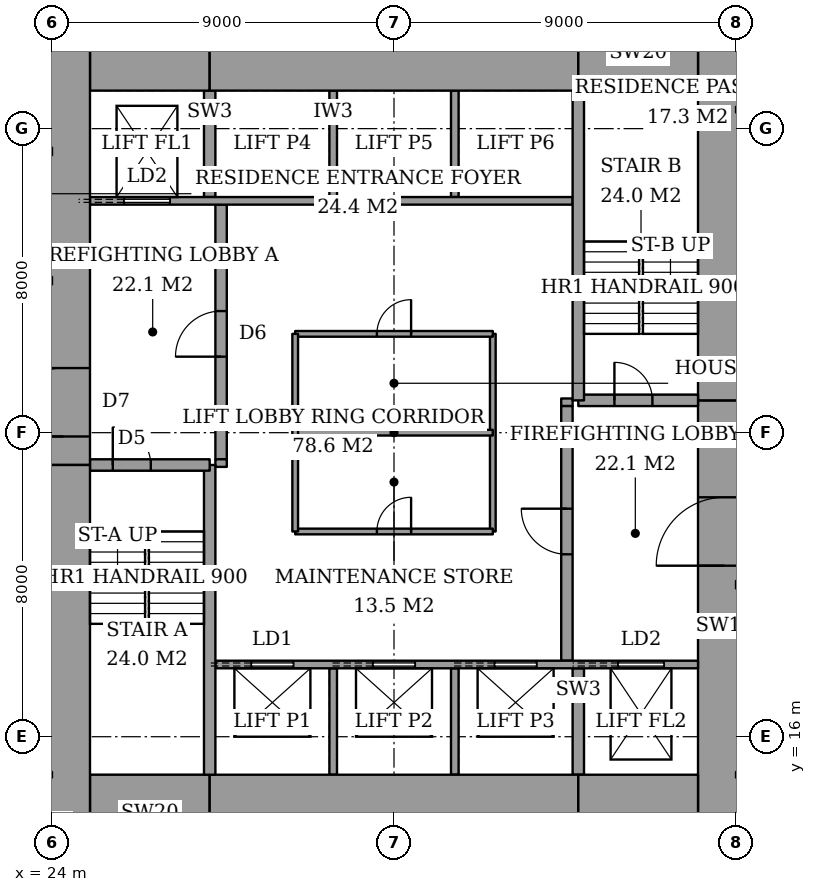
"""IFC4 building model, lengths in metres.
Left out: names, types, materials, properties, quantities, classifications, styles, units other than length and angle.
Written with IfcOpenShell. Run it as: python <this file> out.ifc"""

import sys

from ifc_helpers import new_model, si_unit, direction, frame, frame_2d, origin, place, context, subcontext, project, spatial, rectangle, extrude, element, fill, save


model = new_model("IFC4")
c1 = context("Model", 3, precision=1e-05, world=origin(), true_north=direction((0.0, 1.0)))
c2 = subcontext(c1, "Body", "Model", "MODEL_VIEW")
j1 = project(units=[si_unit("LENGTHUNIT", "METRE"), si_unit("PLANEANGLEUNIT", "RADIAN")], contexts=[c1])
p1 = place(None, origin())
s1 = spatial("IfcSite", under=j1, at=p1, CompositionType="ELEMENT")
p2 = place(p1, origin())
s2 = spatial("IfcBuilding", under=s1, at=p2, CompositionType="ELEMENT")
p3 = place(p2, frame((0.0, 0.0, 69.2)))
s3 = spatial("IfcBuildingStorey", under=s2, at=p3, CompositionType="ELEMENT", Elevation=69.2)
p4 = place(p3, frame((25.0, 14.0, 0.0), z_axis=(0.0, 0.0, 1.0), x_axis=(1.0, 0.0, 0.0)))
e1 = element("IfcWall", 1, at=p4, inside=s3, PredefinedType="SHEAR", context=c2, shape_type="SweptSolid", body=[
    extrude(rectangle(XDim=3.15, YDim=2.0, at=frame_2d((1.575, 0.0))), origin(), (0.0, 0.0, 1.0), 3.6),
])
p5 = place(p3, frame((28.15, 14.0, 0.0), z_axis=(0.0, 0.0, 1.0), x_axis=(1.0, 0.0, 0.0)))
e2 = element("IfcWall", 2, at=p5, inside=s3, PredefinedType="SHEAR", context=c2, shape_type="SweptSolid", body=[
    extrude(rectangle(XDim=9.7, YDim=2.0, at=frame_2d((4.85, 0.0))), origin(), (0.0, 0.0, 1.0), 3.6),
])
for number, where, z_axis, x_axis in (
    (3, (37.85, 14.0, 0.0), (0.0, 0.0, 1.0), (1.0, 0.0, 0.0)),
    (4, (25.0, 34.0, 0.0), (0.0, 0.0, 1.0), (1.0, 0.0, 0.0)),
):
    element("IfcWall", number, at=place(p3, frame(where, z_axis=z_axis, x_axis=x_axis)), inside=s3, PredefinedType="SHEAR", context=c2, shape_type="SweptSolid", body=[
        extrude(rectangle(XDim=3.15, YDim=2.0, at=frame_2d((1.575, 0.0))), origin(), (0.0, 0.0, 1.0), 3.6),
    ])
p6 = place(p3, frame((28.15, 34.0, 0.0), z_axis=(0.0, 0.0, 1.0), x_axis=(1.0, 0.0, 0.0)))
e5 = element("IfcWall", 5, at=p6, inside=s3, PredefinedType="SHEAR", context=c2, shape_type="SweptSolid", body=[
    extrude(rectangle(XDim=9.7, YDim=2.0, at=frame_2d((4.85, 0.0))), origin(), (0.0, 0.0, 1.0), 3.6),
])
p7 = place(p3, frame((37.85, 34.0, 0.0), z_axis=(0.0, 0.0, 1.0), x_axis=(1.0, 0.0, 0.0)))
e6 = element("IfcWall", 6, at=p7, inside=s3, PredefinedType="SHEAR", context=c2, shape_type="SweptSolid", body=[
    extrude(rectangle(XDim=3.15, YDim=2.0, at=frame_2d((1.575, 0.0))), origin(), (0.0, 0.0, 1.0), 3.6),
])
p8 = place(p3, frame((24.3, 13.0, 0.0), z_axis=(0.0, 0.0, 1.0), x_axis=(0.0, 1.0, 0.0)))
e7 = element("IfcWall", 7, at=p8, inside=s3, PredefinedType="SHEAR", context=c2, shape_type="SweptSolid", body=[
    extrude(rectangle(XDim=10.15, YDim=1.4, at=frame_2d((5.075, 0.0))), origin(), (0.0, 0.0, 1.0), 3.6),
])
p9 = place(p3, frame((24.3, 23.15, 0.0), z_axis=(0.0, 0.0, 1.0), x_axis=(0.0, 1.0, 0.0)))
e8 = element("IfcWall", 8, at=p9, inside=s3, PredefinedType="SHEAR", context=c2, shape_type="SweptSolid", body=[
    extrude(rectangle(XDim=11.85, YDim=1.4, at=frame_2d((5.925, 0.0))), origin(), (0.0, 0.0, 1.0), 3.6),
])
p10 = place(p9, frame((0.75, 0.0, 0.0)))
e9 = element("IfcOpeningElement", 9, at=p10, cuts=e8, PredefinedType="OPENING", context=c2, shape_type="SweptSolid", body=[
    extrude(rectangle(XDim=1.8, YDim=2.4, at=frame_2d((0.9, 1.2))), frame((0.0, 0.71, 0.0), z_axis=(0.0, -1.0, 0.0), x_axis=(1.0, 0.0, 0.0)), (0.0, 0.0, 1.0), 1.42),
])
p11 = place(p3, frame((41.7, 13.0, 0.0), z_axis=(0.0, 0.0, 1.0), x_axis=(0.0, 1.0, 0.0)))
e10 = element("IfcWall", 10, at=p11, inside=s3, PredefinedType="SHEAR", context=c2, shape_type="SweptSolid", body=[
    extrude(rectangle(XDim=11.85, YDim=1.4, at=frame_2d((5.925, 0.0))), origin(), (0.0, 0.0, 1.0), 3.6),
])
p12 = place(p11, frame((7.5, 0.0, 0.0)))
e11 = element("IfcOpeningElement", 11, at=p12, cuts=e10, PredefinedType="OPENING", context=c2, shape_type="SweptSolid", body=[
    extrude(rectangle(XDim=1.8, YDim=2.4, at=frame_2d((0.9, 1.2))), frame((0.0, 0.71, 0.0), z_axis=(0.0, -1.0, 0.0), x_axis=(1.0, 0.0, 0.0)), (0.0, 0.0, 1.0), 1.42),
])
p13 = place(p3, frame((41.7, 24.85, 0.0), z_axis=(0.0, 0.0, 1.0), x_axis=(0.0, 1.0, 0.0)))
e12 = element("IfcWall", 12, at=p13, inside=s3, PredefinedType="SHEAR", context=c2, shape_type="SweptSolid", body=[
    extrude(rectangle(XDim=10.15, YDim=1.4, at=frame_2d((5.075, 0.0))), origin(), (0.0, 0.0, 1.0), 3.6),
])
p14 = place(p3, frame((28.15, 15.0, 0.0), z_axis=(0.0, 0.0, 1.0), x_axis=(0.0, 1.0, 0.0)))
e13 = element("IfcWall", 13, at=p14, inside=s3, PredefinedType="SHEAR", context=c2, shape_type="SweptSolid", body=[
    extrude(rectangle(XDim=8.15, YDim=0.3, at=frame_2d((4.075, 0.0))), origin(), (0.0, 0.0, 1.0), 3.6),
])
p15 = place(p3, frame((25.0, 23.15, 0.0), z_axis=(0.0, 0.0, 1.0), x_axis=(1.0, 0.0, 0.0)))
e14 = element("IfcWall", 14, at=p15, inside=s3, PredefinedType="SHEAR", context=c2, shape_type="SweptSolid", body=[
    extrude(rectangle(XDim=3.15, YDim=0.3, at=frame_2d((1.575, 0.0))), origin(), (0.0, 0.0, 1.0), 3.6),
])
p16 = place(p15, frame((0.6, 0.0, 0.0)))
e15 = element("IfcOpeningElement", 15, at=p16, cuts=e14, PredefinedType="OPENING", context=c2, shape_type="SweptSolid", body=[
    extrude(rectangle(XDim=1.0, YDim=2.1, at=frame_2d((0.5, 1.05))), frame((0.0, 0.16, 0.0), z_axis=(0.0, -1.0, 0.0), x_axis=(1.0, 0.0, 0.0)), (0.0, 0.0, 1.0), 0.32),
])
p17 = place(p3, frame((37.85, 24.85, 0.0), z_axis=(0.0, 0.0, 1.0), x_axis=(0.0, 1.0, 0.0)))
e16 = element("IfcWall", 16, at=p17, inside=s3, PredefinedType="SHEAR", context=c2, shape_type="SweptSolid", body=[
    extrude(rectangle(XDim=8.15, YDim=0.3, at=frame_2d((4.075, 0.0))), origin(), (0.0, 0.0, 1.0), 3.6),
])
p18 = place(p3, frame((37.85, 24.85, 0.0), z_axis=(0.0, 0.0, 1.0), x_axis=(1.0, 0.0, 0.0)))
e17 = element("IfcWall", 17, at=p18, inside=s3, PredefinedType="SHEAR", context=c2, shape_type="SweptSolid", body=[
    extrude(rectangle(XDim=3.15, YDim=0.3, at=frame_2d((1.575, 0.0))), origin(), (0.0, 0.0, 1.0), 3.6),
])
p19 = place(p18, frame((0.95, 0.0, 0.0)))
e18 = element("IfcOpeningElement", 18, at=p19, cuts=e17, PredefinedType="OPENING", context=c2, shape_type="SweptSolid", body=[
    extrude(rectangle(XDim=1.0, YDim=2.1, at=frame_2d((0.5, 1.05))), frame((0.0, 0.16, 0.0), z_axis=(0.0, -1.0, 0.0), x_axis=(1.0, 0.0, 0.0)), (0.0, 0.0, 1.0), 0.32),
])
p20 = place(p3, frame((28.45, 23.3, 0.0), z_axis=(0.0, 0.0, 1.0), x_axis=(0.0, 1.0, 0.0)))
e19 = element("IfcWall", 19, at=p20, inside=s3, PredefinedType="PARTITIONING", context=c2, shape_type="SweptSolid", body=[
    extrude(rectangle(XDim=6.7, YDim=0.3, at=frame_2d((3.35, 0.0))), origin(), (0.0, 0.0, 1.0), 3.6),
])
p21 = place(p20, frame((2.7, 0.0, 0.0)))
e20 = element("IfcOpeningElement", 20, at=p21, cuts=e19, PredefinedType="OPENING", context=c2, shape_type="SweptSolid", body=[
    extrude(rectangle(XDim=1.2, YDim=2.1, at=frame_2d((0.6, 1.05))), frame((0.0, 0.16, 0.0), z_axis=(0.0, -1.0, 0.0), x_axis=(1.0, 0.0, 0.0)), (0.0, 0.0, 1.0), 0.32),
])
p22 = place(p3, frame((37.55, 18.0, 0.0), z_axis=(0.0, 0.0, 1.0), x_axis=(0.0, 1.0, 0.0)))
e21 = element("IfcWall", 21, at=p22, inside=s3, PredefinedType="PARTITIONING", context=c2, shape_type="SweptSolid", body=[
    extrude(rectangle(XDim=6.7, YDim=0.3, at=frame_2d((3.35, 0.0))), origin(), (0.0, 0.0, 1.0), 3.6),
])
p23 = place(p22, frame((2.8, 0.0, 0.0)))
e22 = element("IfcOpeningElement", 22, at=p23, cuts=e21, PredefinedType="OPENING", context=c2, shape_type="SweptSolid", body=[
    extrude(rectangle(XDim=1.2, YDim=2.1, at=frame_2d((0.6, 1.05))), frame((0.0, 0.16, 0.0), z_axis=(0.0, -1.0, 0.0), x_axis=(1.0, 0.0, 0.0)), (0.0, 0.0, 1.0), 0.32),
])
p24 = place(p3, frame((28.3, 17.9, 0.0), z_axis=(0.0, 0.0, 1.0), x_axis=(1.0, 0.0, 0.0)))
e23 = element("IfcWall", 23, at=p24, inside=s3, PredefinedType="PARTITIONING", context=c2, shape_type="SweptSolid", body=[
    extrude(rectangle(XDim=12.7, YDim=0.2, at=frame_2d((6.35, 0.0))), origin(), (0.0, 0.0, 1.0), 3.6),
])
p25 = place(p24, frame((0.95, 0.0, 0.0)))
e24 = element("IfcOpeningElement", 24, at=p25, cuts=e23, PredefinedType="OPENING", context=c2, shape_type="SweptSolid", body=[
    extrude(rectangle(XDim=1.1, YDim=2.1, at=frame_2d((0.55, 1.05))), frame((0.0, 0.11, 0.0), z_axis=(0.0, -1.0, 0.0), x_axis=(1.0, 0.0, 0.0)), (0.0, 0.0, 1.0), 0.22),
])
p26 = place(p24, frame((4.15, 0.0, 0.0)))
e25 = element("IfcOpeningElement", 25, at=p26, cuts=e23, PredefinedType="OPENING", context=c2, shape_type="SweptSolid", body=[
    extrude(rectangle(XDim=1.1, YDim=2.1, at=frame_2d((0.55, 1.05))), frame((0.0, 0.11, 0.0), z_axis=(0.0, -1.0, 0.0), x_axis=(1.0, 0.0, 0.0)), (0.0, 0.0, 1.0), 0.22),
])
p27 = place(p24, frame((7.35, 0.0, 0.0)))
e26 = element("IfcOpeningElement", 26, at=p27, cuts=e23, PredefinedType="OPENING", context=c2, shape_type="SweptSolid", body=[
    extrude(rectangle(XDim=1.1, YDim=2.1, at=frame_2d((0.55, 1.05))), frame((0.0, 0.11, 0.0), z_axis=(0.0, -1.0, 0.0), x_axis=(1.0, 0.0, 0.0)), (0.0, 0.0, 1.0), 0.22),
])
p28 = place(p24, frame((10.6, 0.0, 0.0)))
e27 = element("IfcOpeningElement", 27, at=p28, cuts=e23, PredefinedType="OPENING", context=c2, shape_type="SweptSolid", body=[
    extrude(rectangle(XDim=1.2, YDim=2.1, at=frame_2d((0.6, 1.05))), frame((0.0, 0.11, 0.0), z_axis=(0.0, -1.0, 0.0), x_axis=(1.0, 0.0, 0.0)), (0.0, 0.0, 1.0), 0.22),
])
p29 = place(p3, frame((25.0, 30.1, 0.0), z_axis=(0.0, 0.0, 1.0), x_axis=(1.0, 0.0, 0.0)))
e28 = element("IfcWall", 28, at=p29, inside=s3, PredefinedType="PARTITIONING", context=c2, shape_type="SweptSolid", body=[
    extrude(rectangle(XDim=12.7, YDim=0.2, at=frame_2d((6.35, 0.0))), origin(), (0.0, 0.0, 1.0), 3.6),
])
p30 = place(p29, frame((0.9, 0.0, 0.0)))
e29 = element("IfcOpeningElement", 29, at=p30, cuts=e28, PredefinedType="OPENING", context=c2, shape_type="SweptSolid", body=[
    extrude(rectangle(XDim=1.2, YDim=2.1, at=frame_2d((0.6, 1.05))), frame((0.0, 0.11, 0.0), z_axis=(0.0, -1.0, 0.0), x_axis=(1.0, 0.0, 0.0)), (0.0, 0.0, 1.0), 0.22),
])
for number, where, z_axis, x_axis in (
    (30, (31.4, 15.0, 0.0), (0.0, 0.0, 1.0), (0.0, 1.0, 0.0)),
    (31, (34.6, 15.0, 0.0), (0.0, 0.0, 1.0), (0.0, 1.0, 0.0)),
):
    element("IfcWall", number, at=place(p3, frame(where, z_axis=z_axis, x_axis=x_axis)), inside=s3, PredefinedType="PARTITIONING", context=c2, shape_type="SweptSolid", body=[
        extrude(rectangle(XDim=2.8, YDim=0.2, at=frame_2d((1.4, 0.0))), origin(), (0.0, 0.0, 1.0), 3.6),
    ])
p31 = place(p3, frame((37.85, 15.0, 0.0), z_axis=(0.0, 0.0, 1.0), x_axis=(0.0, 1.0, 0.0)))
e32 = element("IfcWall", 32, at=p31, inside=s3, PredefinedType="SHEAR", context=c2, shape_type="SweptSolid", body=[
    extrude(rectangle(XDim=2.8, YDim=0.3, at=frame_2d((1.4, 0.0))), origin(), (0.0, 0.0, 1.0), 3.6),
])
for number, where, z_axis, x_axis in (
    (33, (31.4, 30.2, 0.0), (0.0, 0.0, 1.0), (0.0, 1.0, 0.0)),
    (34, (34.6, 30.2, 0.0), (0.0, 0.0, 1.0), (0.0, 1.0, 0.0)),
):
    element("IfcWall", number, at=place(p3, frame(where, z_axis=z_axis, x_axis=x_axis)), inside=s3, PredefinedType="PARTITIONING", context=c2, shape_type="SweptSolid", body=[
        extrude(rectangle(XDim=2.8, YDim=0.2, at=frame_2d((1.4, 0.0))), origin(), (0.0, 0.0, 1.0), 3.6),
    ])
p32 = place(p3, frame((28.15, 30.2, 0.0), z_axis=(0.0, 0.0, 1.0), x_axis=(0.0, 1.0, 0.0)))
e35 = element("IfcWall", 35, at=p32, inside=s3, PredefinedType="SHEAR", context=c2, shape_type="SweptSolid", body=[
    extrude(rectangle(XDim=2.8, YDim=0.3, at=frame_2d((1.4, 0.0))), origin(), (0.0, 0.0, 1.0), 3.6),
])
for number, where, z_axis, x_axis in (
    (36, (28.3, 23.2, 0.0), (0.0, 0.0, 1.0), (1.0, 0.0, 0.0)),
    (37, (37.4, 24.8, 0.0), (0.0, 0.0, 1.0), (1.0, 0.0, 0.0)),
):
    element("IfcWall", number, at=place(p3, frame(where, z_axis=z_axis, x_axis=x_axis)), inside=s3, PredefinedType="PARTITIONING", context=c2, shape_type="SweptSolid", body=[
        extrude(rectangle(XDim=0.3, YDim=0.2, at=frame_2d((0.15, 0.0))), origin(), (0.0, 0.0, 1.0), 3.6),
    ])
p33 = place(p3, frame((30.4, 21.4, 0.0), z_axis=(0.0, 0.0, 1.0), x_axis=(1.0, 0.0, 0.0)))
e38 = element("IfcWall", 38, at=p33, inside=s3, PredefinedType="PARTITIONING", context=c2, shape_type="SweptSolid", body=[
    extrude(rectangle(XDim=5.2, YDim=0.15, at=frame_2d((2.6, 0.0))), origin(), (0.0, 0.0, 1.0), 3.35),
])
p34 = place(p33, frame((2.15, 0.0, 0.0)))
e39 = element("IfcOpeningElement", 39, at=p34, cuts=e38, PredefinedType="OPENING", context=c2, shape_type="SweptSolid", body=[
    extrude(rectangle(XDim=0.9, YDim=2.1, at=frame_2d((0.45, 1.05))), frame((0.0, 0.085, 0.0), z_axis=(0.0, -1.0, 0.0), x_axis=(1.0, 0.0, 0.0)), (0.0, 0.0, 1.0), 0.17),
])
p35 = place(p3, frame((30.4, 26.6, 0.0), z_axis=(0.0, 0.0, 1.0), x_axis=(1.0, 0.0, 0.0)))
e40 = element("IfcWall", 40, at=p35, inside=s3, PredefinedType="PARTITIONING", context=c2, shape_type="SweptSolid", body=[
    extrude(rectangle(XDim=5.2, YDim=0.15, at=frame_2d((2.6, 0.0))), origin(), (0.0, 0.0, 1.0), 3.35),
])
p36 = place(p35, frame((2.15, 0.0, 0.0)))
e41 = element("IfcOpeningElement", 41, at=p36, cuts=e40, PredefinedType="OPENING", context=c2, shape_type="SweptSolid", body=[
    extrude(rectangle(XDim=0.9, YDim=2.1, at=frame_2d((0.45, 1.05))), frame((0.0, 0.085, 0.0), z_axis=(0.0, -1.0, 0.0), x_axis=(1.0, 0.0, 0.0)), (0.0, 0.0, 1.0), 0.17),
])
for number, where, z_axis, x_axis in (
    (42, (30.4, 21.4, 0.0), (0.0, 0.0, 1.0), (0.0, 1.0, 0.0)),
    (43, (35.6, 21.4, 0.0), (0.0, 0.0, 1.0), (0.0, 1.0, 0.0)),
    (44, (30.4, 24.0, 0.0), (0.0, 0.0, 1.0), (1.0, 0.0, 0.0)),
):
    element("IfcWall", number, at=place(p3, frame(where, z_axis=z_axis, x_axis=x_axis)), inside=s3, PredefinedType="PARTITIONING", context=c2, shape_type="SweptSolid", body=[
        extrude(rectangle(XDim=5.2, YDim=0.15, at=frame_2d((2.6, 0.0))), origin(), (0.0, 0.0, 1.0), 3.35),
    ])
p37 = place(p16, origin())
e45 = element("IfcDoor", 45, at=p37, inside=s3, OperationType="SINGLE_SWING_RIGHT", PredefinedType="DOOR", context=c2, shape_type="SweptSolid", body=[
    extrude(rectangle(XDim=1.0, YDim=2.1, at=frame_2d((0.5, 1.05))), frame((0.0, 0.025, 0.0), z_axis=(0.0, -1.0, 0.0), x_axis=(1.0, 0.0, 0.0)), (0.0, 0.0, 1.0), 0.05),
])
fill(e15, e45)
p38 = place(p19, origin())
e46 = element("IfcDoor", 46, at=p38, inside=s3, OperationType="SINGLE_SWING_RIGHT", PredefinedType="DOOR", context=c2, shape_type="SweptSolid", body=[
    extrude(rectangle(XDim=1.0, YDim=2.1, at=frame_2d((0.5, 1.05))), frame((0.0, 0.025, 0.0), z_axis=(0.0, -1.0, 0.0), x_axis=(1.0, 0.0, 0.0)), (0.0, 0.0, 1.0), 0.05),
])
fill(e18, e46)
p39 = place(p21, origin())
e47 = element("IfcDoor", 47, at=p39, inside=s3, OperationType="SINGLE_SWING_RIGHT", PredefinedType="DOOR", context=c2, shape_type="SweptSolid", body=[
    extrude(rectangle(XDim=1.2, YDim=2.1, at=frame_2d((0.6, 1.05))), frame((0.0, 0.025, 0.0), z_axis=(0.0, -1.0, 0.0), x_axis=(1.0, 0.0, 0.0)), (0.0, 0.0, 1.0), 0.05),
])
fill(e20, e47)
p40 = place(p23, origin())
e48 = element("IfcDoor", 48, at=p40, inside=s3, OperationType="SINGLE_SWING_LEFT", PredefinedType="DOOR", context=c2, shape_type="SweptSolid", body=[
    extrude(rectangle(XDim=1.2, YDim=2.1, at=frame_2d((0.6, 1.05))), frame((0.0, 0.025, 0.0), z_axis=(0.0, -1.0, 0.0), x_axis=(1.0, 0.0, 0.0)), (0.0, 0.0, 1.0), 0.05),
])
fill(e22, e48)
p41 = place(p10, origin())
e49 = element("IfcDoor", 49, at=p41, inside=s3, OperationType="DOUBLE_DOOR_DOUBLE_SWING", PredefinedType="DOOR", context=c2, shape_type="SweptSolid", body=[
    extrude(rectangle(XDim=1.8, YDim=2.4, at=frame_2d((0.9, 1.2))), frame((0.0, 0.025, 0.0), z_axis=(0.0, -1.0, 0.0), x_axis=(1.0, 0.0, 0.0)), (0.0, 0.0, 1.0), 0.05),
])
fill(e9, e49)
p42 = place(p12, origin())
e50 = element("IfcDoor", 50, at=p42, inside=s3, OperationType="DOUBLE_DOOR_DOUBLE_SWING", PredefinedType="DOOR", context=c2, shape_type="SweptSolid", body=[
    extrude(rectangle(XDim=1.8, YDim=2.4, at=frame_2d((0.9, 1.2))), frame((0.0, 0.025, 0.0), z_axis=(0.0, -1.0, 0.0), x_axis=(1.0, 0.0, 0.0)), (0.0, 0.0, 1.0), 0.05),
])
fill(e11, e50)
p43 = place(p34, origin())
e51 = element("IfcDoor", 51, at=p43, inside=s3, OperationType="SINGLE_SWING_LEFT", PredefinedType="DOOR", context=c2, shape_type="SweptSolid", body=[
    extrude(rectangle(XDim=0.9, YDim=2.1, at=frame_2d((0.45, 1.05))), frame((0.0, 0.025, 0.0), z_axis=(0.0, -1.0, 0.0), x_axis=(1.0, 0.0, 0.0)), (0.0, 0.0, 1.0), 0.05),
])
fill(e39, e51)
p44 = place(p36, origin())
e52 = element("IfcDoor", 52, at=p44, inside=s3, OperationType="SINGLE_SWING_LEFT", PredefinedType="DOOR", context=c2, shape_type="SweptSolid", body=[
    extrude(rectangle(XDim=0.9, YDim=2.1, at=frame_2d((0.45, 1.05))), frame((0.0, 0.025, 0.0), z_axis=(0.0, -1.0, 0.0), x_axis=(1.0, 0.0, 0.0)), (0.0, 0.0, 1.0), 0.05),
])
fill(e41, e52)
p45 = place(p25, origin())
e53 = element("IfcDoor", 53, at=p45, inside=s3, OperationType="SLIDING_TO_LEFT", PredefinedType="DOOR", context=c2, shape_type="SweptSolid", body=[
    extrude(rectangle(XDim=1.1, YDim=2.1, at=frame_2d((0.55, 1.05))), frame((0.0, 0.025, 0.0), z_axis=(0.0, -1.0, 0.0), x_axis=(1.0, 0.0, 0.0)), (0.0, 0.0, 1.0), 0.05),
])
fill(e24, e53)
p46 = place(p26, origin())
e54 = element("IfcDoor", 54, at=p46, inside=s3, OperationType="SLIDING_TO_LEFT", PredefinedType="DOOR", context=c2, shape_type="SweptSolid", body=[
    extrude(rectangle(XDim=1.1, YDim=2.1, at=frame_2d((0.55, 1.05))), frame((0.0, 0.025, 0.0), z_axis=(0.0, -1.0, 0.0), x_axis=(1.0, 0.0, 0.0)), (0.0, 0.0, 1.0), 0.05),
])
fill(e25, e54)
p47 = place(p27, origin())
e55 = element("IfcDoor", 55, at=p47, inside=s3, OperationType="SLIDING_TO_LEFT", PredefinedType="DOOR", context=c2, shape_type="SweptSolid", body=[
    extrude(rectangle(XDim=1.1, YDim=2.1, at=frame_2d((0.55, 1.05))), frame((0.0, 0.025, 0.0), z_axis=(0.0, -1.0, 0.0), x_axis=(1.0, 0.0, 0.0)), (0.0, 0.0, 1.0), 0.05),
])
fill(e26, e55)
p48 = place(p30, origin())
e56 = element("IfcDoor", 56, at=p48, inside=s3, OperationType="SLIDING_TO_LEFT", PredefinedType="DOOR", context=c2, shape_type="SweptSolid", body=[
    extrude(rectangle(XDim=1.2, YDim=2.1, at=frame_2d((0.6, 1.05))), frame((0.0, 0.025, 0.0), z_axis=(0.0, -1.0, 0.0), x_axis=(1.0, 0.0, 0.0)), (0.0, 0.0, 1.0), 0.05),
])
fill(e29, e56)
p49 = place(p28, origin())
e57 = element("IfcDoor", 57, at=p49, inside=s3, OperationType="SLIDING_TO_LEFT", PredefinedType="DOOR", context=c2, shape_type="SweptSolid", body=[
    extrude(rectangle(XDim=1.2, YDim=2.1, at=frame_2d((0.6, 1.05))), frame((0.0, 0.025, 0.0), z_axis=(0.0, -1.0, 0.0), x_axis=(1.0, 0.0, 0.0)), (0.0, 0.0, 1.0), 0.05),
])
fill(e27, e57)
save(model, sys.argv[1])
